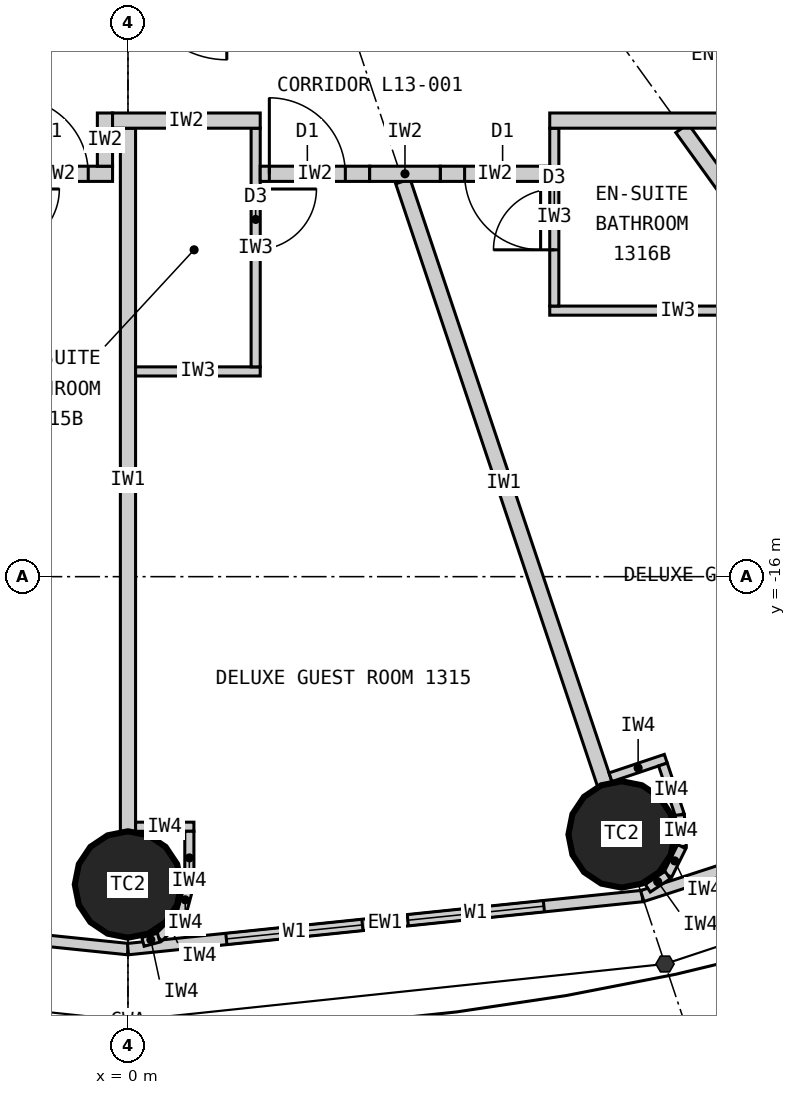
"""IFC4 building model, lengths in metres.
Left out: names, types, materials, properties, quantities, classifications, styles, units other than length and angle.
Written with IfcOpenShell. Run it as: python <this file> out.ifc"""

import sys

from ifc_helpers import new_model, si_unit, direction, frame, frame_2d, origin, origin_2d, place, context, subcontext, project, spatial, rectangle, circle, extrude, element, fill, save


model = new_model("IFC4")
c1 = context("Model", 3, precision=1e-05, world=origin(), true_north=direction((0.0, 1.0)))
c2 = subcontext(c1, "Body", "Model", "MODEL_VIEW")
j1 = project(units=[si_unit("LENGTHUNIT", "METRE"), si_unit("PLANEANGLEUNIT", "RADIAN")], contexts=[c1])
p1 = place(None, origin())
s1 = spatial("IfcSite", under=j1, at=p1, CompositionType="ELEMENT")
p2 = place(p1, origin())
s2 = spatial("IfcBuilding", under=s1, at=p2, CompositionType="ELEMENT")
p3 = place(p2, frame((0.0, 0.0, 57.3)))
s3 = spatial("IfcBuildingStorey", under=s2, at=p3, CompositionType="ELEMENT", Elevation=57.3)
for number, where, z_axis, x_axis in (
    (1, (0.0, -20.05, 0.0), (0.0, 0.0, 1.0), (1.0, 0.0, 0.0)),
    (2, (6.495, -19.391, 0.0), (0.0, 0.0, 1.0), (1.0, 0.0, 0.0)),
):
    element("IfcColumn", number, at=place(p3, frame(where, z_axis=z_axis, x_axis=x_axis)), inside=s3, PredefinedType="COLUMN", context=c2, shape_type="SweptSolid", body=[
        extrude(circle(Radius=0.7, at=origin_2d()), origin(), (0.0, 0.0, 1.0), 3.3),
    ])
p4 = place(p3, frame((-6.766, -20.202, 0.0), z_axis=(0.0, 0.0, 1.0), x_axis=(0.994721394369, -0.102612609291, 0.0)))
e3 = element("IfcWall", 3, at=p4, inside=s3, PredefinedType="ELEMENTEDWALL", context=c2, shape_type="SweptSolid", body=[
    extrude(rectangle(XDim=6.802, YDim=0.15, at=frame_2d((3.401, 0.0))), origin(), (0.0, 0.0, 1.0), 3.12),
])
p5 = place(p4, frame((1.301, 0.0, 0.9)))
e4 = element("IfcOpeningElement", 4, at=p5, cuts=e3, PredefinedType="OPENING", context=c2, shape_type="SweptSolid", body=[
    extrude(rectangle(XDim=1.8, YDim=1.9, at=frame_2d((0.9, 0.95))), frame((0.0, 0.085, 0.0), z_axis=(0.0, -1.0, 0.0), x_axis=(1.0, 0.0, 0.0)), (0.0, 0.0, 1.0), 0.17),
])
p6 = place(p4, frame((3.701, 0.0, 0.9)))
e5 = element("IfcOpeningElement", 5, at=p6, cuts=e3, PredefinedType="OPENING", context=c2, shape_type="SweptSolid", body=[
    extrude(rectangle(XDim=1.8, YDim=1.9, at=frame_2d((0.9, 0.95))), frame((0.0, 0.085, 0.0), z_axis=(0.0, -1.0, 0.0), x_axis=(1.0, 0.0, 0.0)), (0.0, 0.0, 1.0), 0.17),
])
p7 = place(p3, frame((0.0, -20.9, 0.0), z_axis=(0.0, 0.0, 1.0), x_axis=(0.994721394369, 0.102612609291, 0.0)))
e6 = element("IfcWall", 6, at=p7, inside=s3, PredefinedType="ELEMENTEDWALL", context=c2, shape_type="SweptSolid", body=[
    extrude(rectangle(XDim=6.802, YDim=0.15, at=frame_2d((3.401, 0.0))), origin(), (0.0, 0.0, 1.0), 3.12),
])
p8 = place(p7, frame((1.301, 0.0, 0.9)))
e7 = element("IfcOpeningElement", 7, at=p8, cuts=e6, PredefinedType="OPENING", context=c2, shape_type="SweptSolid", body=[
    extrude(rectangle(XDim=1.8, YDim=1.9, at=frame_2d((0.9, 0.95))), frame((0.0, 0.085, 0.0), z_axis=(0.0, -1.0, 0.0), x_axis=(1.0, 0.0, 0.0)), (0.0, 0.0, 1.0), 0.17),
])
p9 = place(p7, frame((3.701, 0.0, 0.9)))
e8 = element("IfcOpeningElement", 8, at=p9, cuts=e6, PredefinedType="OPENING", context=c2, shape_type="SweptSolid", body=[
    extrude(rectangle(XDim=1.8, YDim=1.9, at=frame_2d((0.9, 0.95))), frame((0.0, 0.085, 0.0), z_axis=(0.0, -1.0, 0.0), x_axis=(1.0, 0.0, 0.0)), (0.0, 0.0, 1.0), 0.17),
])
p10 = place(p3, frame((6.766, -20.202, 0.0), z_axis=(0.0, 0.0, 1.0), x_axis=(0.951137534625, 0.308767534285, 0.0)))
e9 = element("IfcWall", 9, at=p10, inside=s3, PredefinedType="ELEMENTEDWALL", context=c2, shape_type="SweptSolid", body=[
    extrude(rectangle(XDim=6.655, YDim=0.15, at=frame_2d((3.328, 0.0))), origin(), (0.0, 0.0, 1.0), 3.12),
])
p11 = place(p10, frame((1.228, 0.0, 0.9)))
e10 = element("IfcOpeningElement", 10, at=p11, cuts=e9, PredefinedType="OPENING", context=c2, shape_type="SweptSolid", body=[
    extrude(rectangle(XDim=1.8, YDim=1.9, at=frame_2d((0.9, 0.95))), frame((0.0, 0.085, 0.0), z_axis=(0.0, -1.0, 0.0), x_axis=(1.0, 0.0, 0.0)), (0.0, 0.0, 1.0), 0.17),
])
p12 = place(p10, frame((3.628, 0.0, 0.9)))
e11 = element("IfcOpeningElement", 11, at=p12, cuts=e9, PredefinedType="OPENING", context=c2, shape_type="SweptSolid", body=[
    extrude(rectangle(XDim=1.8, YDim=1.9, at=frame_2d((0.9, 0.95))), frame((0.0, 0.085, 0.0), z_axis=(0.0, -1.0, 0.0), x_axis=(1.0, 0.0, 0.0)), (0.0, 0.0, 1.0), 0.17),
])
p13 = place(p3, frame((0.0, -10.1, 0.0), z_axis=(0.0, 0.0, 1.0), x_axis=(0.0, -1.0, 0.0)))
e12 = element("IfcWall", 12, at=p13, inside=s3, PredefinedType="PARTITIONING", context=c2, shape_type="SweptSolid", body=[
    extrude(rectangle(XDim=9.25, YDim=0.2, at=frame_2d((4.625, 0.0))), origin(), (0.0, 0.0, 1.0), 2.32),
])
p14 = place(p3, frame((3.617, -10.8, 0.0), z_axis=(0.0, 0.0, 1.0), x_axis=(0.317576599239, -0.948232621046, 0.0)))
e13 = element("IfcWall", 13, at=p14, inside=s3, PredefinedType="PARTITIONING", context=c2, shape_type="SweptSolid", body=[
    extrude(rectangle(XDim=8.36, YDim=0.2, at=frame_2d((4.18, 0.0))), origin(), (0.0, 0.0, 1.0), 2.32),
])
p15 = place(p3, frame((7.289, -10.1, 0.0), z_axis=(0.0, 0.0, 1.0), x_axis=(0.585198353053, -0.810890182197, 0.0)))
e14 = element("IfcWall", 14, at=p15, inside=s3, PredefinedType="PARTITIONING", context=c2, shape_type="SweptSolid", body=[
    extrude(rectangle(XDim=8.36, YDim=0.2, at=frame_2d((4.18, 0.0))), origin(), (0.0, 0.0, 1.0), 2.32),
])
p16 = place(p3, frame((0.1, -13.3, 0.0), z_axis=(0.0, 0.0, 1.0), x_axis=(1.0, 0.0, 0.0)))
e15 = element("IfcWall", 15, at=p16, inside=s3, PredefinedType="PARTITIONING", context=c2, shape_type="SweptSolid", body=[
    extrude(rectangle(XDim=1.64, YDim=0.12, at=frame_2d((0.82, 0.0))), origin(), (0.0, 0.0, 1.0), 3.12),
])
p17 = place(p3, frame((1.68, -10.1, 0.0), z_axis=(0.0, 0.0, 1.0), x_axis=(0.0, -1.0, 0.0)))
e16 = element("IfcWall", 16, at=p17, inside=s3, PredefinedType="PARTITIONING", context=c2, shape_type="SweptSolid", body=[
    extrude(rectangle(XDim=3.14, YDim=0.12, at=frame_2d((1.57, 0.0))), origin(), (0.0, 0.0, 1.0), 3.12),
])
p18 = place(p17, frame((0.8, 0.0, 0.0)))
e17 = element("IfcOpeningElement", 17, at=p18, cuts=e16, PredefinedType="OPENING", context=c2, shape_type="SweptSolid", body=[
    extrude(rectangle(XDim=0.8, YDim=2.1, at=frame_2d((0.4, 1.05))), frame((0.0, 0.07, 0.0), z_axis=(0.0, -1.0, 0.0), x_axis=(1.0, 0.0, 0.0)), (0.0, 0.0, 1.0), 0.14),
])
p19 = place(p3, frame((8.921, -12.5, 0.0), z_axis=(0.0, 0.0, 1.0), x_axis=(-1.0, 0.0, 0.0)))
e18 = element("IfcWall", 18, at=p19, inside=s3, PredefinedType="PARTITIONING", context=c2, shape_type="SweptSolid", body=[
    extrude(rectangle(XDim=3.372, YDim=0.12, at=frame_2d((1.686, 0.0))), origin(), (0.0, 0.0, 1.0), 3.12),
])
p20 = place(p3, frame((5.609, -10.1, 0.0), z_axis=(0.0, 0.0, 1.0), x_axis=(0.0, -1.0, 0.0)))
e19 = element("IfcWall", 19, at=p20, inside=s3, PredefinedType="PARTITIONING", context=c2, shape_type="SweptSolid", body=[
    extrude(rectangle(XDim=2.34, YDim=0.12, at=frame_2d((1.17, 0.0))), origin(), (0.0, 0.0, 1.0), 3.12),
])
p21 = place(p20, frame((0.8, 0.0, 0.0)))
e20 = element("IfcOpeningElement", 20, at=p21, cuts=e19, PredefinedType="OPENING", context=c2, shape_type="SweptSolid", body=[
    extrude(rectangle(XDim=0.8, YDim=2.1, at=frame_2d((0.4, 1.05))), frame((0.0, 0.07, 0.0), z_axis=(0.0, -1.0, 0.0), x_axis=(1.0, 0.0, 0.0)), (0.0, 0.0, 1.0), 0.14),
])
p22 = place(p3, frame((-0.203, -10.7, 0.0), z_axis=(0.0, 0.0, 1.0), x_axis=(-1.0, 0.0, 0.0)))
e21 = element("IfcWall", 21, at=p22, inside=s3, PredefinedType="PARTITIONING", context=c2, shape_type="SweptSolid", body=[
    extrude(rectangle(XDim=1.44, YDim=0.2, at=frame_2d((0.72, 0.0))), origin(), (0.0, 0.0, 1.0), 3.12),
])
p23 = place(p22, frame((0.32, 0.0, 0.0)))
e22 = element("IfcOpeningElement", 22, at=p23, cuts=e21, PredefinedType="OPENING", context=c2, shape_type="SweptSolid", body=[
    extrude(rectangle(XDim=1.0, YDim=2.2, at=frame_2d((0.5, 1.1))), frame((0.0, 0.11, 0.0), z_axis=(0.0, -1.0, 0.0), x_axis=(1.0, 0.0, 0.0)), (0.0, 0.0, 1.0), 0.22),
])
p24 = place(p3, frame((-0.303, -9.9, 0.0), z_axis=(0.0, 0.0, 1.0), x_axis=(0.0, -1.0, 0.0)))
e23 = element("IfcWall", 23, at=p24, inside=s3, PredefinedType="PARTITIONING", context=c2, shape_type="SweptSolid", body=[
    extrude(rectangle(XDim=0.7, YDim=0.2, at=frame_2d((0.35, 0.0))), origin(), (0.0, 0.0, 1.0), 3.12),
])
p25 = place(p3, frame((3.18, -10.7, 0.0), z_axis=(0.0, 0.0, 1.0), x_axis=(-1.0, 0.0, 0.0)))
e24 = element("IfcWall", 24, at=p25, inside=s3, PredefinedType="PARTITIONING", context=c2, shape_type="SweptSolid", body=[
    extrude(rectangle(XDim=1.44, YDim=0.2, at=frame_2d((0.72, 0.0))), origin(), (0.0, 0.0, 1.0), 3.12),
])
p26 = place(p25, frame((0.32, 0.0, 0.0)))
e25 = element("IfcOpeningElement", 25, at=p26, cuts=e24, PredefinedType="OPENING", context=c2, shape_type="SweptSolid", body=[
    extrude(rectangle(XDim=1.0, YDim=2.2, at=frame_2d((0.5, 1.1))), frame((0.0, 0.11, 0.0), z_axis=(0.0, -1.0, 0.0), x_axis=(1.0, 0.0, 0.0)), (0.0, 0.0, 1.0), 0.22),
])
p27 = place(p3, frame((5.549, -10.7, 0.0), z_axis=(0.0, 0.0, 1.0), x_axis=(-1.0, 0.0, 0.0)))
e26 = element("IfcWall", 26, at=p27, inside=s3, PredefinedType="PARTITIONING", context=c2, shape_type="SweptSolid", body=[
    extrude(rectangle(XDim=1.44, YDim=0.2, at=frame_2d((0.72, 0.0))), origin(), (0.0, 0.0, 1.0), 3.12),
])
p28 = place(p27, frame((0.12, 0.0, 0.0)))
e27 = element("IfcOpeningElement", 27, at=p28, cuts=e26, PredefinedType="OPENING", context=c2, shape_type="SweptSolid", body=[
    extrude(rectangle(XDim=1.0, YDim=2.2, at=frame_2d((0.5, 1.1))), frame((0.0, 0.11, 0.0), z_axis=(0.0, -1.0, 0.0), x_axis=(1.0, 0.0, 0.0)), (0.0, 0.0, 1.0), 0.22),
])
p29 = place(p3, frame((4.109, -10.7, 0.0), z_axis=(0.0, 0.0, 1.0), x_axis=(-1.0, 0.0, 0.0)))
e28 = element("IfcWall", 28, at=p29, inside=s3, PredefinedType="PARTITIONING", context=c2, shape_type="SweptSolid", body=[
    extrude(rectangle(XDim=0.929, YDim=0.2, at=frame_2d((0.465, 0.0))), origin(), (0.0, 0.0, 1.0), 3.12),
])
p30 = place(p3, frame((10.179, -10.0, 0.0), z_axis=(0.0, 0.0, 1.0), x_axis=(-1.0, 0.0, 0.0)))
e29 = element("IfcWall", 29, at=p30, inside=s3, PredefinedType="PARTITIONING", context=c2, shape_type="SweptSolid", body=[
    extrude(rectangle(XDim=4.63, YDim=0.2, at=frame_2d((2.315, 0.0))), origin(), (0.0, 0.0, 1.0), 3.12),
])
p31 = place(p3, frame((1.74, -10.0, 0.0), z_axis=(0.0, 0.0, 1.0), x_axis=(-1.0, 0.0, 0.0)))
e30 = element("IfcWall", 30, at=p31, inside=s3, PredefinedType="PARTITIONING", context=c2, shape_type="SweptSolid", body=[
    extrude(rectangle(XDim=1.943, YDim=0.2, at=frame_2d((0.971, 0.0))), origin(), (0.0, 0.0, 1.0), 3.12),
])
p32 = place(p3, frame((0.1, -19.29, 0.0), z_axis=(0.0, 0.0, 1.0), x_axis=(1.0, 0.0, 0.0)))
e31 = element("IfcWall", 31, at=p32, inside=s3, PredefinedType="PARTITIONING", context=c2, shape_type="SweptSolid", body=[
    extrude(rectangle(XDim=0.767, YDim=0.12, at=frame_2d((0.384, 0.0))), origin(), (0.0, 0.0, 1.0), 3.12),
])
p33 = place(p3, frame((0.808, -19.35, 0.0), z_axis=(0.0, 0.0, 1.0), x_axis=(0.0, -1.0, 0.0)))
e32 = element("IfcWall", 32, at=p33, inside=s3, PredefinedType="PARTITIONING", context=c2, shape_type="SweptSolid", body=[
    extrude(rectangle(XDim=0.7, YDim=0.12, at=frame_2d((0.35, 0.0))), origin(), (0.0, 0.0, 1.0), 3.12),
])
p34 = place(p3, frame((0.808, -20.05, 0.0), z_axis=(0.0, 0.0, 1.0), x_axis=(-0.2592614205, -0.965807183573, 0.0)))
e33 = element("IfcWall", 33, at=p34, inside=s3, PredefinedType="PARTITIONING", context=c2, shape_type="SweptSolid", body=[
    extrude(rectangle(XDim=0.418, YDim=0.12, at=frame_2d((0.209, 0.0))), origin(), (0.0, 0.0, 1.0), 3.12),
])
p35 = place(p3, frame((0.699, -20.454, 0.0), z_axis=(0.0, 0.0, 1.0), x_axis=(-0.707106781187, -0.707106781187, 0.0)))
e34 = element("IfcWall", 34, at=p35, inside=s3, PredefinedType="PARTITIONING", context=c2, shape_type="SweptSolid", body=[
    extrude(rectangle(XDim=0.418, YDim=0.12, at=frame_2d((0.209, 0.0))), origin(), (0.0, 0.0, 1.0), 3.12),
])
p36 = place(p3, frame((0.404, -20.749, 0.0), z_axis=(0.0, 0.0, 1.0), x_axis=(-0.965759066438, -0.25944060128, 0.0)))
e35 = element("IfcWall", 35, at=p36, inside=s3, PredefinedType="PARTITIONING", context=c2, shape_type="SweptSolid", body=[
    extrude(rectangle(XDim=0.214, YDim=0.12, at=frame_2d((0.107, 0.0))), origin(), (0.0, 0.0, 1.0), 3.12),
])
p37 = place(p3, frame((6.348, -18.639, 0.0), z_axis=(0.0, 0.0, 1.0), x_axis=(0.948268951266, 0.317468102437, 0.0)))
e36 = element("IfcWall", 36, at=p37, inside=s3, PredefinedType="PARTITIONING", context=c2, shape_type="SweptSolid", body=[
    extrude(rectangle(XDim=0.768, YDim=0.12, at=frame_2d((0.384, 0.0))), origin(), (0.0, 0.0, 1.0), 3.12),
])
p38 = place(p3, frame((7.038, -18.471, 0.0), z_axis=(0.0, 0.0, 1.0), x_axis=(0.317378466199, -0.9482989556, 0.0)))
e37 = element("IfcWall", 37, at=p38, inside=s3, PredefinedType="PARTITIONING", context=c2, shape_type="SweptSolid", body=[
    extrude(rectangle(XDim=0.7, YDim=0.12, at=frame_2d((0.35, 0.0))), origin(), (0.0, 0.0, 1.0), 3.12),
])
p39 = place(p3, frame((7.26, -19.135, 0.0), z_axis=(0.0, 0.0, 1.0), x_axis=(0.0613238046, -0.99811792439, 0.0)))
e38 = element("IfcWall", 38, at=p39, inside=s3, PredefinedType="PARTITIONING", context=c2, shape_type="SweptSolid", body=[
    extrude(rectangle(XDim=0.418, YDim=0.12, at=frame_2d((0.209, 0.0))), origin(), (0.0, 0.0, 1.0), 3.12),
])
p40 = place(p3, frame((7.286, -19.552, 0.0), z_axis=(0.0, 0.0, 1.0), x_axis=(-0.445810757773, -0.89512723579, 0.0)))
e39 = element("IfcWall", 39, at=p40, inside=s3, PredefinedType="PARTITIONING", context=c2, shape_type="SweptSolid", body=[
    extrude(rectangle(XDim=0.418, YDim=0.12, at=frame_2d((0.209, 0.0))), origin(), (0.0, 0.0, 1.0), 3.12),
])
p41 = place(p3, frame((7.1, -19.926, 0.0), z_axis=(0.0, 0.0, 1.0), x_axis=(-0.833488262509, -0.552537162787, 0.0)))
e40 = element("IfcWall", 40, at=p41, inside=s3, PredefinedType="PARTITIONING", context=c2, shape_type="SweptSolid", body=[
    extrude(rectangle(XDim=0.313, YDim=0.12, at=frame_2d((0.156, 0.0))), origin(), (0.0, 0.0, 1.0), 3.12),
])
p42 = place(p8, origin())
e41 = element("IfcWindow", 41, at=p42, inside=s3, PartitioningType="SINGLE_PANEL", PredefinedType="WINDOW", context=c2, shape_type="SweptSolid", body=[
    extrude(rectangle(XDim=1.8, YDim=1.9, at=frame_2d((0.9, 0.95))), frame((0.0, 0.03, 0.0), z_axis=(0.0, -1.0, 0.0), x_axis=(1.0, 0.0, 0.0)), (0.0, 0.0, 1.0), 0.06),
])
fill(e7, e41)
p43 = place(p9, origin())
e42 = element("IfcWindow", 42, at=p43, inside=s3, PartitioningType="SINGLE_PANEL", PredefinedType="WINDOW", context=c2, shape_type="SweptSolid", body=[
    extrude(rectangle(XDim=1.8, YDim=1.9, at=frame_2d((0.9, 0.95))), frame((0.0, 0.03, 0.0), z_axis=(0.0, -1.0, 0.0), x_axis=(1.0, 0.0, 0.0)), (0.0, 0.0, 1.0), 0.06),
])
fill(e8, e42)
p44 = place(p23, origin())
e43 = element("IfcDoor", 43, at=p44, inside=s3, OperationType="SINGLE_SWING_RIGHT", PredefinedType="DOOR", context=c2, shape_type="SweptSolid", body=[
    extrude(rectangle(XDim=1.0, YDim=2.2, at=frame_2d((0.5, 1.1))), frame((0.0, 0.025, 0.0), z_axis=(0.0, -1.0, 0.0), x_axis=(1.0, 0.0, 0.0)), (0.0, 0.0, 1.0), 0.05),
])
fill(e22, e43)
p45 = place(p18, origin())
e44 = element("IfcDoor", 44, at=p45, inside=s3, OperationType="SINGLE_SWING_LEFT", PredefinedType="DOOR", context=c2, shape_type="SweptSolid", body=[
    extrude(rectangle(XDim=0.8, YDim=2.1, at=frame_2d((0.4, 1.05))), frame((0.0, 0.025, 0.0), z_axis=(0.0, -1.0, 0.0), x_axis=(1.0, 0.0, 0.0)), (0.0, 0.0, 1.0), 0.05),
])
fill(e17, e44)
p46 = place(p26, origin())
e45 = element("IfcDoor", 45, at=p46, inside=s3, OperationType="SINGLE_SWING_RIGHT", PredefinedType="DOOR", context=c2, shape_type="SweptSolid", body=[
    extrude(rectangle(XDim=1.0, YDim=2.2, at=frame_2d((0.5, 1.1))), frame((0.0, 0.025, 0.0), z_axis=(0.0, -1.0, 0.0), x_axis=(1.0, 0.0, 0.0)), (0.0, 0.0, 1.0), 0.05),
])
fill(e25, e45)
p47 = place(p21, origin())
e46 = element("IfcDoor", 46, at=p47, inside=s3, OperationType="SINGLE_SWING_RIGHT", PredefinedType="DOOR", context=c2, shape_type="SweptSolid", body=[
    extrude(rectangle(XDim=0.8, YDim=2.1, at=frame_2d((0.4, 1.05))), frame((0.0, 0.025, 0.0), z_axis=(0.0, -1.0, 0.0), x_axis=(1.0, 0.0, 0.0)), (0.0, 0.0, 1.0), 0.05),
])
fill(e20, e46)
p48 = place(p28, origin())
e47 = element("IfcDoor", 47, at=p48, inside=s3, OperationType="SINGLE_SWING_LEFT", PredefinedType="DOOR", context=c2, shape_type="SweptSolid", body=[
    extrude(rectangle(XDim=1.0, YDim=2.2, at=frame_2d((0.5, 1.1))), frame((0.0, 0.025, 0.0), z_axis=(0.0, -1.0, 0.0), x_axis=(1.0, 0.0, 0.0)), (0.0, 0.0, 1.0), 0.05),
])
fill(e27, e47)
save(model, sys.argv[1])
